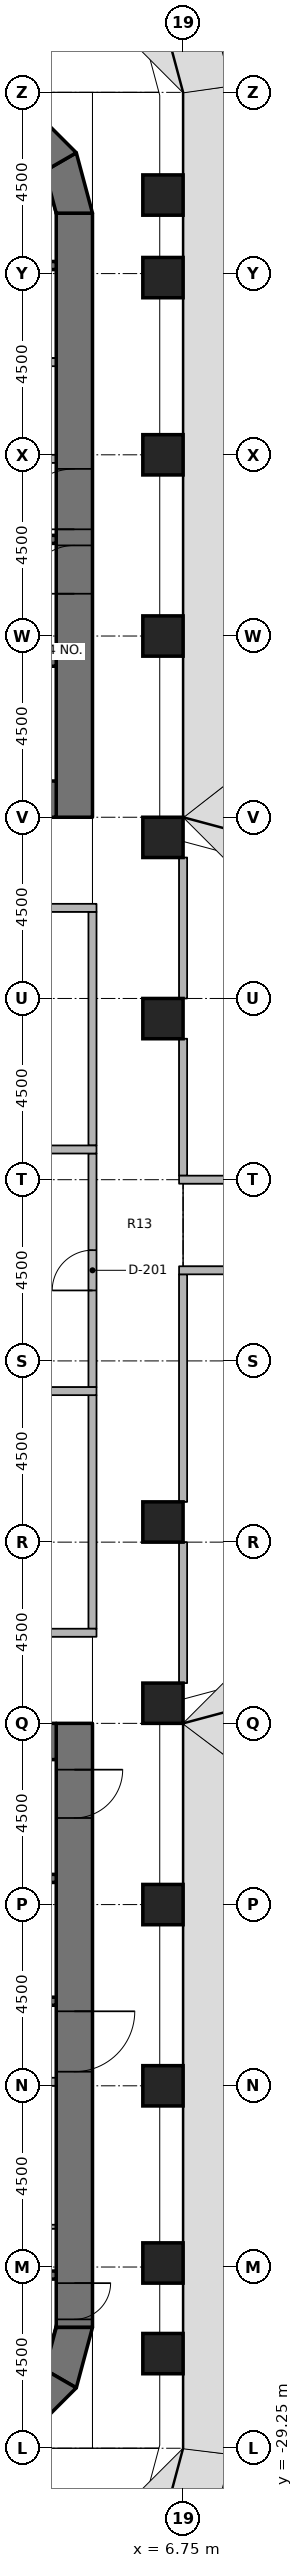
"""IFC4 building model, lengths in metres.
Left out: names, types, materials, properties, quantities, classifications, styles, units other than length and angle.
Written with IfcOpenShell. Run it as: python <this file> out.ifc"""

import sys

from ifc_helpers import new_model, si_unit, direction, frame, frame_2d, origin, origin_2d, place, context, subcontext, project, spatial, polyline, rectangle, outline, extrude, element, fill, save


model = new_model("IFC4")
c1 = context("Model", 3, precision=1e-05, world=origin(), true_north=direction((0.0, 1.0)))
c2 = subcontext(c1, "Body", "Model", "MODEL_VIEW")
j1 = project(units=[si_unit("LENGTHUNIT", "METRE"), si_unit("PLANEANGLEUNIT", "RADIAN")], contexts=[c1])
p1 = place(None, origin())
s1 = spatial("IfcSite", under=j1, at=p1, CompositionType="ELEMENT")
p2 = place(p1, origin())
s2 = spatial("IfcBuilding", under=s1, at=p2, CompositionType="ELEMENT")
p3 = place(p2, frame((0.0, 0.0, 31.2)))
s3 = spatial("IfcBuildingStorey", under=s2, at=p3, CompositionType="ELEMENT", Elevation=31.2)
for number, where, z_axis, x_axis in (
    (1, (6.25, -26.9, 0.0), (0.0, 0.0, 1.0), (1.0, 0.0, 0.0)),
    (2, (6.25, -24.65, 0.0), (0.0, 0.0, 1.0), (1.0, 0.0, 0.0)),
    (3, (6.25, -20.25, 0.0), (0.0, 0.0, 1.0), (1.0, 0.0, 0.0)),
    (4, (6.25, -15.75, 0.0), (0.0, 0.0, 1.0), (1.0, 0.0, 0.0)),
    (5, (6.25, -10.75, 0.0), (0.0, 0.0, 1.0), (1.0, 0.0, 0.0)),
    (6, (6.25, -6.25, 0.0), (0.0, 0.0, 1.0), (1.0, 0.0, 0.0)),
    (7, (6.25, 6.25, 0.0), (0.0, 0.0, 1.0), (1.0, 0.0, 0.0)),
    (8, (6.25, 10.75, 0.0), (0.0, 0.0, 1.0), (1.0, 0.0, 0.0)),
    (9, (6.25, 15.75, 0.0), (0.0, 0.0, 1.0), (1.0, 0.0, 0.0)),
    (10, (6.25, 20.25, 0.0), (0.0, 0.0, 1.0), (1.0, 0.0, 0.0)),
    (11, (6.25, 24.65, 0.0), (0.0, 0.0, 1.0), (1.0, 0.0, 0.0)),
    (12, (6.25, 26.7, 0.0), (0.0, 0.0, 1.0), (1.0, 0.0, 0.0)),
):
    element("IfcColumn", number, at=place(p3, frame(where, z_axis=z_axis, x_axis=x_axis)), inside=s3, PredefinedType="COLUMN", context=c2, shape_type="SweptSolid", body=[
        extrude(rectangle(XDim=1.0, YDim=1.0, at=origin_2d()), origin(), (0.0, 0.0, 1.0), 4.05),
    ])
p4 = place(p3, frame((4.05, 11.25, 0.0), z_axis=(0.0, 0.0, 1.0), x_axis=(0.0, 1.0, 0.0)))
e13 = element("IfcWall", 13, at=p4, inside=s3, PredefinedType="SHEAR", context=c2, shape_type="SweptSolid", body=[
    extrude(rectangle(XDim=15.0, YDim=0.9, at=frame_2d((7.5, 0.0))), origin(), (0.0, 0.0, 1.0), 4.2),
])
p5 = place(p4, frame((7.15, 0.0, 0.0)))
e14 = element("IfcOpeningElement", 14, at=p5, cuts=e13, PredefinedType="OPENING", context=c2, shape_type="SweptSolid", body=[
    extrude(rectangle(XDim=1.5, YDim=2.3, at=frame_2d((0.75, 1.15))), frame((0.0, 0.46, 0.0), z_axis=(0.0, -1.0, 0.0), x_axis=(1.0, 0.0, 0.0)), (0.0, 0.0, 1.0), 0.92),
])
p6 = place(p4, frame((5.55, 0.0, 0.0)))
e15 = element("IfcOpeningElement", 15, at=p6, cuts=e13, PredefinedType="OPENING", context=c2, shape_type="SweptSolid", body=[
    extrude(rectangle(XDim=1.2, YDim=2.1, at=frame_2d((0.6, 1.05))), frame((0.0, 0.46, 0.0), z_axis=(0.0, -1.0, 0.0), x_axis=(1.0, 0.0, 0.0)), (0.0, 0.0, 1.0), 0.92),
])
p7 = place(p3, frame((-3.6, 11.7, 0.0), z_axis=(0.0, 0.0, 1.0), x_axis=(1.0, 0.0, 0.0)))
e16 = element("IfcWall", 16, at=p7, inside=s3, PredefinedType="SHEAR", context=c2, shape_type="SweptSolid", body=[
    extrude(rectangle(XDim=7.2, YDim=0.9, at=frame_2d((3.6, 0.0))), origin(), (0.0, 0.0, 1.0), 4.2),
])
p8 = place(p3, origin())
e17 = element("IfcWall", 17, at=p8, inside=s3, PredefinedType="SHEAR", context=c2, shape_type="SweptSolid", body=[
    extrude(outline(polyline([(4.5, 26.25), (4.098, 27.75), (3.319, 27.3), (3.6, 26.25), (4.5, 26.25)])), origin(), (0.0, 0.0, 1.0), 4.2),
])
p9 = place(p3, origin())
e18 = element("IfcWall", 18, at=p9, inside=s3, PredefinedType="SHEAR", context=c2, shape_type="SweptSolid", body=[
    extrude(outline(polyline([(4.098, 27.75), (3.0, 28.848), (2.55, 28.069), (3.319, 27.3), (4.098, 27.75)])), origin(), (0.0, 0.0, 1.0), 4.2),
])
p10 = place(p3, frame((4.05, -11.25, 0.0), z_axis=(0.0, 0.0, 1.0), x_axis=(0.0, -1.0, 0.0)))
e19 = element("IfcWall", 19, at=p10, inside=s3, PredefinedType="SHEAR", context=c2, shape_type="SweptSolid", body=[
    extrude(rectangle(XDim=15.0, YDim=0.9, at=frame_2d((7.5, 0.0))), origin(), (0.0, 0.0, 1.0), 4.2),
])
p11 = place(p10, frame((7.15, 0.0, 0.0)))
e20 = element("IfcOpeningElement", 20, at=p11, cuts=e19, PredefinedType="OPENING", context=c2, shape_type="SweptSolid", body=[
    extrude(rectangle(XDim=1.5, YDim=2.3, at=frame_2d((0.75, 1.15))), frame((0.0, 0.46, 0.0), z_axis=(0.0, -1.0, 0.0), x_axis=(1.0, 0.0, 0.0)), (0.0, 0.0, 1.0), 0.92),
])
p12 = place(p10, frame((13.9, 0.0, 0.0)))
e21 = element("IfcOpeningElement", 21, at=p12, cuts=e19, PredefinedType="OPENING", context=c2, shape_type="SweptSolid", body=[
    extrude(rectangle(XDim=0.9, YDim=2.1, at=frame_2d((0.45, 1.05))), frame((0.0, 0.46, 0.0), z_axis=(0.0, -1.0, 0.0), x_axis=(1.0, 0.0, 0.0)), (0.0, 0.0, 1.0), 0.92),
])
p13 = place(p10, frame((1.15, 0.0, 0.0)))
e22 = element("IfcOpeningElement", 22, at=p13, cuts=e19, PredefinedType="OPENING", context=c2, shape_type="SweptSolid", body=[
    extrude(rectangle(XDim=1.2, YDim=2.1, at=frame_2d((0.6, 1.05))), frame((0.0, 0.46, 0.0), z_axis=(0.0, -1.0, 0.0), x_axis=(1.0, 0.0, 0.0)), (0.0, 0.0, 1.0), 0.92),
])
p14 = place(p3, frame((-3.6, -11.7, 0.0), z_axis=(0.0, 0.0, 1.0), x_axis=(1.0, 0.0, 0.0)))
e23 = element("IfcWall", 23, at=p14, inside=s3, PredefinedType="SHEAR", context=c2, shape_type="SweptSolid", body=[
    extrude(rectangle(XDim=7.2, YDim=0.9, at=frame_2d((3.6, 0.0))), origin(), (0.0, 0.0, 1.0), 4.2),
])
p15 = place(p3, origin())
e24 = element("IfcWall", 24, at=p15, inside=s3, PredefinedType="SHEAR", context=c2, shape_type="SweptSolid", body=[
    extrude(outline(polyline([(4.5, -26.25), (4.098, -27.75), (3.319, -27.3), (3.6, -26.25), (4.5, -26.25)])), origin(), (0.0, 0.0, 1.0), 4.2),
])
p16 = place(p3, origin())
e25 = element("IfcWall", 25, at=p16, inside=s3, PredefinedType="SHEAR", context=c2, shape_type="SweptSolid", body=[
    extrude(outline(polyline([(4.098, -27.75), (3.0, -28.848), (2.55, -28.069), (3.319, -27.3), (4.098, -27.75)])), origin(), (0.0, 0.0, 1.0), 4.2),
])
for number, where, z_axis, x_axis in (
    (26, (-3.6, 24.95, 0.0), (0.0, 0.0, 1.0), (1.0, 0.0, 0.0)),
    (27, (-3.6, 18.15, 0.0), (0.0, 0.0, 1.0), (1.0, 0.0, 0.0)),
    (28, (-3.6, 15.1, 0.0), (0.0, 0.0, 1.0), (1.0, 0.0, 0.0)),
):
    element("IfcWall", number, at=place(p3, frame(where, z_axis=z_axis, x_axis=x_axis)), inside=s3, PredefinedType="SHEAR", context=c2, shape_type="SweptSolid", body=[
        extrude(rectangle(XDim=7.2, YDim=0.2, at=frame_2d((3.6, 0.0))), origin(), (0.0, 0.0, 1.0), 4.05),
    ])
p17 = place(p3, frame((0.9, 20.15, 0.0), z_axis=(0.0, 0.0, 1.0), x_axis=(1.0, 0.0, 0.0)))
e29 = element("IfcWall", 29, at=p17, inside=s3, PredefinedType="PARTITIONING", context=c2, shape_type="SweptSolid", body=[
    extrude(rectangle(XDim=2.7, YDim=0.2, at=frame_2d((1.35, 0.0))), origin(), (0.0, 0.0, 1.0), 4.05),
])
p18 = place(p3, frame((1.1, 22.55, 0.0), z_axis=(0.0, 0.0, 1.0), x_axis=(1.0, 0.0, 0.0)))
e30 = element("IfcWall", 30, at=p18, inside=s3, PredefinedType="PARTITIONING", context=c2, shape_type="SweptSolid", body=[
    extrude(rectangle(XDim=2.5, YDim=0.2, at=frame_2d((1.25, 0.0))), origin(), (0.0, 0.0, 1.0), 4.05),
])
for number, where, z_axis, x_axis in (
    (31, (3.6, -24.95, 0.0), (0.0, 0.0, 1.0), (-1.0, 0.0, 0.0)),
    (32, (3.6, -18.15, 0.0), (0.0, 0.0, 1.0), (-1.0, 0.0, 0.0)),
    (33, (3.6, -15.1, 0.0), (0.0, 0.0, 1.0), (-1.0, 0.0, 0.0)),
):
    element("IfcWall", number, at=place(p3, frame(where, z_axis=z_axis, x_axis=x_axis)), inside=s3, PredefinedType="SHEAR", context=c2, shape_type="SweptSolid", body=[
        extrude(rectangle(XDim=7.2, YDim=0.2, at=frame_2d((3.6, 0.0))), origin(), (0.0, 0.0, 1.0), 4.05),
    ])
p19 = place(p3, frame((3.6, -20.15, 0.0), z_axis=(0.0, 0.0, 1.0), x_axis=(-1.0, 0.0, 0.0)))
e34 = element("IfcWall", 34, at=p19, inside=s3, PredefinedType="PARTITIONING", context=c2, shape_type="SweptSolid", body=[
    extrude(rectangle(XDim=2.7, YDim=0.2, at=frame_2d((1.35, 0.0))), origin(), (0.0, 0.0, 1.0), 4.05),
])
p20 = place(p3, frame((3.6, -23.75, 0.0), z_axis=(0.0, 0.0, 1.0), x_axis=(-1.0, 0.0, 0.0)))
e35 = element("IfcWall", 35, at=p20, inside=s3, PredefinedType="PARTITIONING", context=c2, shape_type="SweptSolid", body=[
    extrude(rectangle(XDim=2.5, YDim=0.1, at=frame_2d((1.25, 0.0))), origin(), (0.0, 0.0, 1.0), 4.05),
])
p21 = place(p3, frame((4.5, 3.1, 0.0), z_axis=(0.0, 0.0, 1.0), x_axis=(0.0, 1.0, 0.0)))
e36 = element("IfcWall", 36, at=p21, inside=s3, PredefinedType="PARTITIONING", context=c2, shape_type="SweptSolid", body=[
    extrude(rectangle(XDim=5.8, YDim=0.2, at=frame_2d((2.9, 0.0))), origin(), (0.0, 0.0, 1.0), 3.131),
])
p22 = place(p3, frame((4.5, -2.9, 0.0), z_axis=(0.0, 0.0, 1.0), x_axis=(0.0, 1.0, 0.0)))
e37 = element("IfcWall", 37, at=p22, inside=s3, PredefinedType="PARTITIONING", context=c2, shape_type="SweptSolid", body=[
    extrude(rectangle(XDim=5.8, YDim=0.2, at=frame_2d((2.9, 0.0))), origin(), (0.0, 0.0, 1.0), 3.131),
])
p23 = place(p22, frame((2.4, 0.0, 0.0)))
e38 = element("IfcOpeningElement", 38, at=p23, cuts=e37, PredefinedType="OPENING", context=c2, shape_type="SweptSolid", body=[
    extrude(rectangle(XDim=1.0, YDim=2.1, at=frame_2d((0.5, 1.05))), frame((0.0, 0.11, 0.0), z_axis=(0.0, -1.0, 0.0), x_axis=(1.0, 0.0, 0.0)), (0.0, 0.0, 1.0), 0.22),
])
p24 = place(p3, frame((4.5, -8.9, 0.0), z_axis=(0.0, 0.0, 1.0), x_axis=(0.0, 1.0, 0.0)))
e39 = element("IfcWall", 39, at=p24, inside=s3, PredefinedType="PARTITIONING", context=c2, shape_type="SweptSolid", body=[
    extrude(rectangle(XDim=5.8, YDim=0.2, at=frame_2d((2.9, 0.0))), origin(), (0.0, 0.0, 1.0), 3.131),
])
p25 = place(p3, frame((6.75, 2.35, 0.0), z_axis=(0.0, 0.0, 1.0), x_axis=(0.0, 1.0, 0.0)))
e40 = element("IfcWall", 40, at=p25, inside=s3, PredefinedType="PARTITIONING", context=c2, shape_type="SweptSolid", body=[
    extrude(rectangle(XDim=3.4, YDim=0.2, at=frame_2d((1.7, 0.0))), origin(), (0.0, 0.0, 1.0), 3.131),
])
for number, where, z_axis, x_axis in (
    (41, (6.75, 6.75, 0.0), (0.0, 0.0, 1.0), (0.0, 1.0, 0.0)),
    (42, (6.75, -10.25, 0.0), (0.0, 0.0, 1.0), (0.0, 1.0, 0.0)),
):
    element("IfcWall", number, at=place(p3, frame(where, z_axis=z_axis, x_axis=x_axis)), inside=s3, PredefinedType="PARTITIONING", context=c2, shape_type="SweptSolid", body=[
        extrude(rectangle(XDim=3.5, YDim=0.2, at=frame_2d((1.75, 0.0))), origin(), (0.0, 0.0, 1.0), 3.131),
    ])
p26 = place(p3, frame((6.75, -5.75, 0.0), z_axis=(0.0, 0.0, 1.0), x_axis=(0.0, 1.0, 0.0)))
e43 = element("IfcWall", 43, at=p26, inside=s3, PredefinedType="PARTITIONING", context=c2, shape_type="SweptSolid", body=[
    extrude(rectangle(XDim=5.65, YDim=0.2, at=frame_2d((2.825, 0.0))), origin(), (0.0, 0.0, 1.0), 3.131),
])
p27 = place(p3, frame((4.6, 9.0, 0.0), z_axis=(0.0, 0.0, 1.0), x_axis=(-1.0, 0.0, 0.0)))
e44 = element("IfcWall", 44, at=p27, inside=s3, PredefinedType="PARTITIONING", context=c2, shape_type="SweptSolid", body=[
    extrude(rectangle(XDim=9.2, YDim=0.2, at=frame_2d((4.6, 0.0))), origin(), (0.0, 0.0, 1.0), 3.131),
])
p28 = place(p27, frame((4.1, 0.0, 0.0)))
e45 = element("IfcOpeningElement", 45, at=p28, cuts=e44, PredefinedType="OPENING", context=c2, shape_type="SweptSolid", body=[
    extrude(rectangle(XDim=1.0, YDim=2.1, at=frame_2d((0.5, 1.05))), frame((0.0, 0.11, 0.0), z_axis=(0.0, -1.0, 0.0), x_axis=(1.0, 0.0, 0.0)), (0.0, 0.0, 1.0), 0.22),
])
p29 = place(p3, frame((-4.6, -9.0, 0.0), z_axis=(0.0, 0.0, 1.0), x_axis=(1.0, 0.0, 0.0)))
e46 = element("IfcWall", 46, at=p29, inside=s3, PredefinedType="PARTITIONING", context=c2, shape_type="SweptSolid", body=[
    extrude(rectangle(XDim=9.2, YDim=0.2, at=frame_2d((4.6, 0.0))), origin(), (0.0, 0.0, 1.0), 3.131),
])
p30 = place(p29, frame((4.1, 0.0, 0.0)))
e47 = element("IfcOpeningElement", 47, at=p30, cuts=e46, PredefinedType="OPENING", context=c2, shape_type="SweptSolid", body=[
    extrude(rectangle(XDim=1.0, YDim=2.1, at=frame_2d((0.5, 1.05))), frame((0.0, 0.11, 0.0), z_axis=(0.0, -1.0, 0.0), x_axis=(1.0, 0.0, 0.0)), (0.0, 0.0, 1.0), 0.22),
])
for number, where, z_axis, x_axis in (
    (48, (-4.6, 3.0, 0.0), (0.0, 0.0, 1.0), (1.0, 0.0, 0.0)),
    (49, (-4.6, -3.0, 0.0), (0.0, 0.0, 1.0), (1.0, 0.0, 0.0)),
):
    element("IfcWall", number, at=place(p3, frame(where, z_axis=z_axis, x_axis=x_axis)), inside=s3, PredefinedType="PARTITIONING", context=c2, shape_type="SweptSolid", body=[
        extrude(rectangle(XDim=9.2, YDim=0.2, at=frame_2d((4.6, 0.0))), origin(), (0.0, 0.0, 1.0), 3.131),
    ])
p31 = place(p3, frame((6.65, 2.25, 0.0), z_axis=(0.0, 0.0, 1.0), x_axis=(1.0, 0.0, 0.0)))
e50 = element("IfcWall", 50, at=p31, inside=s3, PredefinedType="PARTITIONING", context=c2, shape_type="SweptSolid", body=[
    extrude(rectangle(XDim=4.7, YDim=0.2, at=frame_2d((2.35, 0.0))), origin(), (0.0, 0.0, 1.0), 3.131),
])
p32 = place(p31, frame((1.85, 0.0, 0.0)))
e51 = element("IfcOpeningElement", 51, at=p32, cuts=e50, PredefinedType="OPENING", context=c2, shape_type="SweptSolid", body=[
    extrude(rectangle(XDim=1.0, YDim=2.1, at=frame_2d((0.5, 1.05))), frame((0.0, 0.11, 0.0), z_axis=(0.0, -1.0, 0.0), x_axis=(1.0, 0.0, 0.0)), (0.0, 0.0, 1.0), 0.22),
])
p33 = place(p3, frame((11.35, 0.0, 0.0), z_axis=(0.0, 0.0, 1.0), x_axis=(-1.0, 0.0, 0.0)))
e52 = element("IfcWall", 52, at=p33, inside=s3, PredefinedType="PARTITIONING", context=c2, shape_type="SweptSolid", body=[
    extrude(rectangle(XDim=4.7, YDim=0.2, at=frame_2d((2.35, 0.0))), origin(), (0.0, 0.0, 1.0), 3.131),
])
p34 = place(p33, frame((1.85, 0.0, 0.0)))
e53 = element("IfcOpeningElement", 53, at=p34, cuts=e52, PredefinedType="OPENING", context=c2, shape_type="SweptSolid", body=[
    extrude(rectangle(XDim=1.0, YDim=2.1, at=frame_2d((0.5, 1.05))), frame((0.0, 0.11, 0.0), z_axis=(0.0, -1.0, 0.0), x_axis=(1.0, 0.0, 0.0)), (0.0, 0.0, 1.0), 0.22),
])
p35 = place(p5, origin())
e54 = element("IfcDoor", 54, at=p35, inside=s3, OperationType="DOUBLE_DOOR_SINGLE_SWING", PredefinedType="DOOR", context=c2, shape_type="SweptSolid", body=[
    extrude(rectangle(XDim=1.5, YDim=2.3, at=frame_2d((0.75, 1.15))), frame((0.0, 0.025, 0.0), z_axis=(0.0, -1.0, 0.0), x_axis=(1.0, 0.0, 0.0)), (0.0, 0.0, 1.0), 0.05),
])
fill(e14, e54)
p36 = place(p6, origin())
e55 = element("IfcDoor", 55, at=p36, inside=s3, OperationType="SINGLE_SWING_RIGHT", PredefinedType="DOOR", context=c2, shape_type="SweptSolid", body=[
    extrude(rectangle(XDim=1.2, YDim=2.1, at=frame_2d((0.6, 1.05))), frame((0.0, 0.025, 0.0), z_axis=(0.0, -1.0, 0.0), x_axis=(1.0, 0.0, 0.0)), (0.0, 0.0, 1.0), 0.05),
])
fill(e15, e55)
p37 = place(p11, origin())
e56 = element("IfcDoor", 56, at=p37, inside=s3, OperationType="DOUBLE_DOOR_SINGLE_SWING", PredefinedType="DOOR", context=c2, shape_type="SweptSolid", body=[
    extrude(rectangle(XDim=1.5, YDim=2.3, at=frame_2d((0.75, 1.15))), frame((0.0, 0.025, 0.0), z_axis=(0.0, -1.0, 0.0), x_axis=(1.0, 0.0, 0.0)), (0.0, 0.0, 1.0), 0.05),
])
fill(e20, e56)
p38 = place(p12, origin())
e57 = element("IfcDoor", 57, at=p38, inside=s3, OperationType="SINGLE_SWING_LEFT", PredefinedType="DOOR", context=c2, shape_type="SweptSolid", body=[
    extrude(rectangle(XDim=0.9, YDim=2.1, at=frame_2d((0.45, 1.05))), frame((0.0, 0.025, 0.0), z_axis=(0.0, -1.0, 0.0), x_axis=(1.0, 0.0, 0.0)), (0.0, 0.0, 1.0), 0.05),
])
fill(e21, e57)
p39 = place(p13, origin())
e58 = element("IfcDoor", 58, at=p39, inside=s3, OperationType="SINGLE_SWING_RIGHT", PredefinedType="DOOR", context=c2, shape_type="SweptSolid", body=[
    extrude(rectangle(XDim=1.2, YDim=2.1, at=frame_2d((0.6, 1.05))), frame((0.0, 0.025, 0.0), z_axis=(0.0, -1.0, 0.0), x_axis=(1.0, 0.0, 0.0)), (0.0, 0.0, 1.0), 0.05),
])
fill(e22, e58)
p40 = place(p23, origin())
e59 = element("IfcDoor", 59, at=p40, inside=s3, OperationType="SINGLE_SWING_RIGHT", PredefinedType="DOOR", context=c2, shape_type="SweptSolid", body=[
    extrude(rectangle(XDim=1.0, YDim=2.1, at=frame_2d((0.5, 1.05))), frame((0.0, 0.025, 0.0), z_axis=(0.0, -1.0, 0.0), x_axis=(1.0, 0.0, 0.0)), (0.0, 0.0, 1.0), 0.05),
])
fill(e38, e59)
save(model, sys.argv[1])
